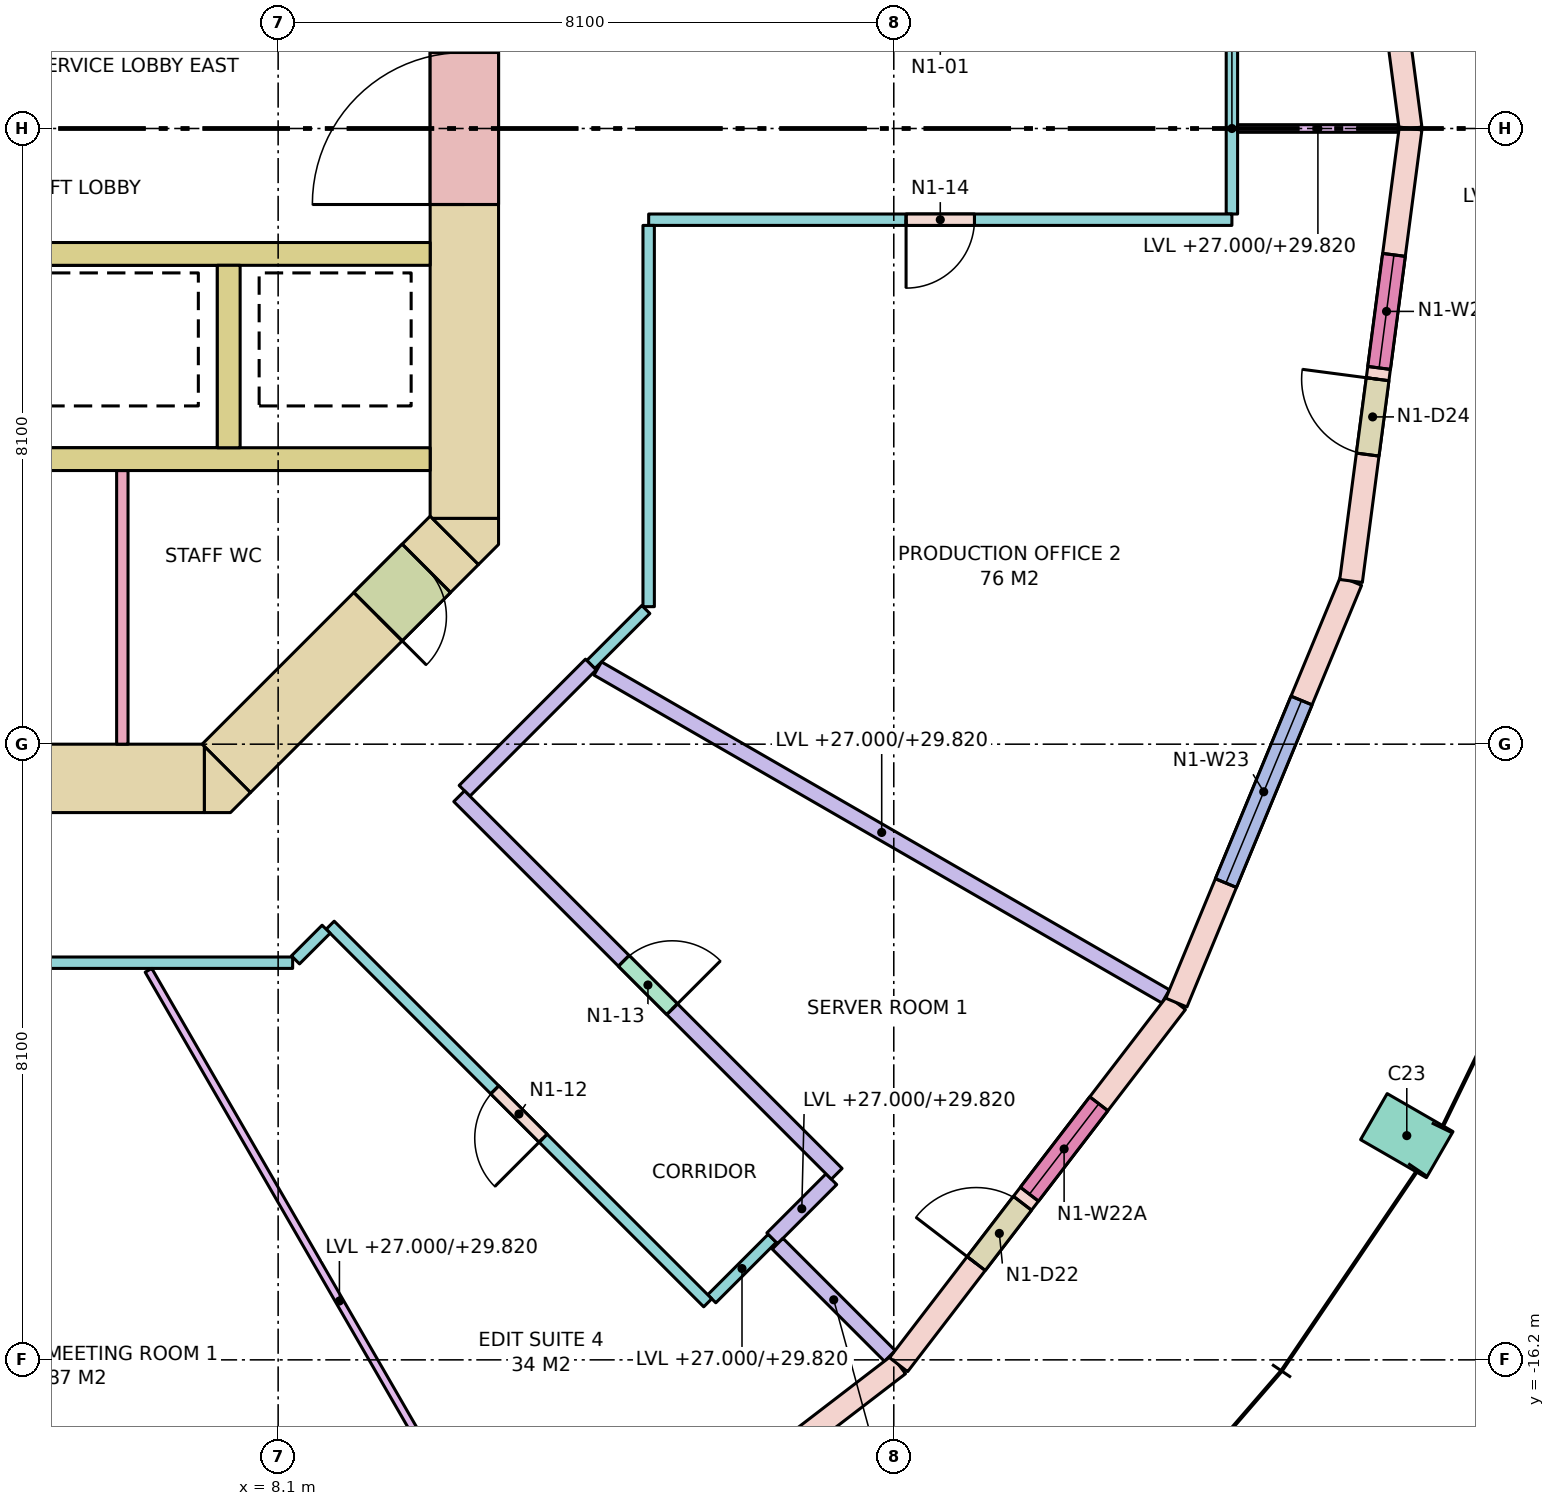
"""IFC4 building model, lengths in metres.
Left out: names, types, materials, properties, quantities, classifications, styles, units other than length and angle.
Written with IfcOpenShell. Run it as: python <this file> out.ifc"""

import sys

from ifc_helpers import new_model, si_unit, direction, frame, frame_2d, origin, origin_2d, place, context, subcontext, project, spatial, polyline, rectangle, outline, extrude, element, fill, save


model = new_model("IFC4")
c1 = context("Model", 3, precision=1e-05, world=origin(), true_north=direction((0.0, 1.0)))
c2 = subcontext(c1, "Body", "Model", "MODEL_VIEW")
j1 = project(units=[si_unit("LENGTHUNIT", "METRE"), si_unit("PLANEANGLEUNIT", "RADIAN")], contexts=[c1])
p1 = place(None, origin())
s1 = spatial("IfcSite", under=j1, at=p1, CompositionType="ELEMENT")
p2 = place(p1, origin())
s2 = spatial("IfcBuilding", under=s1, at=p2, CompositionType="ELEMENT")
p3 = place(p2, frame((0.0, 0.0, 27.0)))
s3 = spatial("IfcBuildingStorey", under=s2, at=p3, CompositionType="ELEMENT", Elevation=27.0)
p4 = place(p3, frame((22.95, -13.25, 0.0), z_axis=(0.0, 0.0, 1.0), x_axis=(0.5, 0.866025403784, 0.0)))
e1 = element("IfcColumn", 1, at=p4, inside=s3, PredefinedType="COLUMN", context=c2, shape_type="SweptSolid", body=[
    extrude(rectangle(XDim=0.7, YDim=1.0, at=origin_2d()), origin(), (0.0, 0.0, 1.0), 4.0),
])
p5 = place(p3, frame((-7.13, -8.55, -0.28), z_axis=(0.0, 0.0, 1.0), x_axis=(1.0, 0.0, 0.0)))
e2 = element("IfcWall", 2, at=p5, inside=s3, PredefinedType="SHEAR", context=c2, shape_type="SweptSolid", body=[
    extrude(rectangle(XDim=14.26, YDim=0.9, at=frame_2d((7.13, 0.0))), origin(), (0.0, 0.0, 1.0), 4.0),
])
p6 = place(p5, frame((8.08, 0.0, 0.28)))
e3 = element("IfcOpeningElement", 3, at=p6, cuts=e2, PredefinedType="OPENING", context=c2, shape_type="SweptSolid", body=[
    extrude(rectangle(XDim=0.7, YDim=2.1, at=frame_2d((0.35, 1.05))), frame((0.0, 0.46, 0.0), z_axis=(0.0, -1.0, 0.0), x_axis=(1.0, 0.0, 0.0)), (0.0, 0.0, 1.0), 0.92),
])
p7 = place(p5, frame((6.205, 0.0, 0.28)))
e4 = element("IfcOpeningElement", 4, at=p7, cuts=e2, PredefinedType="OPENING", context=c2, shape_type="SweptSolid", body=[
    extrude(rectangle(XDim=0.9, YDim=2.1, at=frame_2d((0.45, 1.05))), frame((0.0, 0.46, 0.0), z_axis=(0.0, -1.0, 0.0), x_axis=(1.0, 0.0, 0.0)), (0.0, 0.0, 1.0), 0.92),
])
p8 = place(p5, frame((10.667, 0.0, 0.28)))
e5 = element("IfcOpeningElement", 5, at=p8, cuts=e2, PredefinedType="OPENING", context=c2, shape_type="SweptSolid", body=[
    extrude(rectangle(XDim=0.9, YDim=2.1, at=frame_2d((0.45, 1.05))), frame((0.0, 0.46, 0.0), z_axis=(0.0, -1.0, 0.0), x_axis=(1.0, 0.0, 0.0)), (0.0, 0.0, 1.0), 0.92),
])
p9 = place(p3, frame((10.55, -5.13, -0.28), z_axis=(0.0, 0.0, 1.0), x_axis=(0.0, 1.0, 0.0)))
e6 = element("IfcWall", 6, at=p9, inside=s3, PredefinedType="SHEAR", context=c2, shape_type="SweptSolid", body=[
    extrude(rectangle(XDim=10.26, YDim=0.9, at=frame_2d((5.13, 0.0))), origin(), (0.0, 0.0, 1.0), 4.0),
])
p10 = place(p9, frame((4.13, 0.0, 0.28)))
e7 = element("IfcOpeningElement", 7, at=p10, cuts=e6, PredefinedType="OPENING", context=c2, shape_type="SweptSolid", body=[
    extrude(rectangle(XDim=2.0, YDim=2.1, at=frame_2d((1.0, 1.05))), frame((0.0, 0.46, 0.0), z_axis=(0.0, -1.0, 0.0), x_axis=(1.0, 0.0, 0.0)), (0.0, 0.0, 1.0), 0.92),
])
p11 = place(p3, frame((10.418, -5.418, -0.28), z_axis=(0.0, 0.0, 1.0), x_axis=(-0.707106781187, -0.707106781187, 0.0)))
e8 = element("IfcWall", 8, at=p11, inside=s3, PredefinedType="SHEAR", context=c2, shape_type="SweptSolid", body=[
    extrude(rectangle(XDim=4.243, YDim=0.9, at=frame_2d((2.121, 0.0))), origin(), (0.0, 0.0, 1.0), 4.0),
])
p12 = place(p11, frame((0.52, 0.0, 0.28)))
e9 = element("IfcOpeningElement", 9, at=p12, cuts=e8, PredefinedType="OPENING", context=c2, shape_type="SweptSolid", body=[
    extrude(rectangle(XDim=0.9, YDim=2.1, at=frame_2d((0.45, 1.05))), frame((0.0, 0.46, 0.0), z_axis=(0.0, -1.0, 0.0), x_axis=(1.0, 0.0, 0.0)), (0.0, 0.0, 1.0), 0.92),
])
p13 = place(p3, frame((0.0, 0.0, -0.28)))
e10 = element("IfcWall", 10, at=p13, inside=s3, PredefinedType="SHEAR", context=c2, shape_type="SweptSolid", body=[
    extrude(outline(polyline([(7.473, -9.0), (7.13, -9.0), (7.13, -8.13), (7.736, -8.736), (7.473, -9.0)])), origin(), (0.0, 0.0, 1.0), 4.0),
])
p14 = place(p3, frame((0.0, 0.0, -0.28)))
e11 = element("IfcWall", 11, at=p14, inside=s3, PredefinedType="SHEAR", context=c2, shape_type="SweptSolid", body=[
    extrude(outline(polyline([(11.0, -5.473), (10.736, -5.736), (10.13, -5.13), (11.0, -5.13), (11.0, -5.473)])), origin(), (0.0, 0.0, 1.0), 4.0),
])
for number, where, z_axis, x_axis in (
    (12, (2.0, -4.35, 0.0), (0.0, 0.0, 1.0), (1.0, 0.0, 0.0)),
    (13, (2.0, -1.65, 0.0), (0.0, 0.0, 1.0), (1.0, 0.0, 0.0)),
):
    element("IfcWall", number, at=place(p3, frame(where, z_axis=z_axis, x_axis=x_axis)), inside=s3, PredefinedType="SOLIDWALL", context=c2, shape_type="SweptSolid", body=[
        extrude(rectangle(XDim=8.1, YDim=0.3, at=frame_2d((4.05, 0.0))), origin(), (0.0, 0.0, 1.0), 3.72),
    ])
p15 = place(p3, frame((7.45, -4.2, 0.0), z_axis=(0.0, 0.0, 1.0), x_axis=(0.0, 1.0, 0.0)))
e14 = element("IfcWall", 14, at=p15, inside=s3, PredefinedType="SOLIDWALL", context=c2, shape_type="SweptSolid", body=[
    extrude(rectangle(XDim=2.4, YDim=0.3, at=frame_2d((1.2, 0.0))), origin(), (0.0, 0.0, 1.0), 3.72),
])
p16 = place(p3, frame((23.0, 0.0, 0.0), z_axis=(0.0, 0.0, 1.0), x_axis=(-0.130522880875, 0.991445297315, 0.0)))
e15 = element("IfcWall", 15, at=p16, inside=s3, PredefinedType="STANDARD", context=c2, shape_type="SweptSolid", body=[
    extrude(rectangle(XDim=6.004, YDim=0.3, at=frame_2d((3.002, 0.0))), origin(), (0.0, 0.0, 1.0), 3.72),
])
p17 = place(p16, frame((1.702, 0.0, 0.8)))
e16 = element("IfcOpeningElement", 16, at=p17, cuts=e15, PredefinedType="OPENING", context=c2, shape_type="SweptSolid", body=[
    extrude(rectangle(XDim=2.6, YDim=2.7, at=frame_2d((1.3, 1.35))), frame((0.0, 0.16, 0.0), z_axis=(0.0, -1.0, 0.0), x_axis=(1.0, 0.0, 0.0)), (0.0, 0.0, 1.0), 0.32),
])
p18 = place(p3, frame((11.5, -19.919, 0.0), z_axis=(0.0, 0.0, 1.0), x_axis=(0.793339924758, 0.608778912074, 0.0)))
e17 = element("IfcWall", 17, at=p18, inside=s3, PredefinedType="STANDARD", context=c2, shape_type="SweptSolid", body=[
    extrude(rectangle(XDim=6.004, YDim=0.3, at=frame_2d((3.002, 0.0))), origin(), (0.0, 0.0, 1.0), 3.72),
])
p19 = place(p18, frame((1.702, 0.0, 0.8)))
e18 = element("IfcOpeningElement", 18, at=p19, cuts=e17, PredefinedType="OPENING", context=c2, shape_type="SweptSolid", body=[
    extrude(rectangle(XDim=2.6, YDim=2.7, at=frame_2d((1.3, 1.35))), frame((0.0, 0.16, 0.0), z_axis=(0.0, -1.0, 0.0), x_axis=(1.0, 0.0, 0.0)), (0.0, 0.0, 1.0), 0.32),
])
p20 = place(p3, frame((16.263, -16.263, 0.0), z_axis=(0.0, 0.0, 1.0), x_axis=(0.608778912074, 0.793339924758, 0.0)))
e19 = element("IfcWall", 19, at=p20, inside=s3, PredefinedType="STANDARD", context=c2, shape_type="SweptSolid", body=[
    extrude(rectangle(XDim=6.004, YDim=0.3, at=frame_2d((3.002, 0.0))), origin(), (0.0, 0.0, 1.0), 3.72),
])
p21 = place(p20, frame((1.677, 0.0, 0.0)))
e20 = element("IfcOpeningElement", 20, at=p21, cuts=e19, PredefinedType="OPENING", context=c2, shape_type="SweptSolid", body=[
    extrude(rectangle(XDim=1.0, YDim=2.4, at=frame_2d((0.5, 1.2))), frame((0.0, 0.16, 0.0), z_axis=(0.0, -1.0, 0.0), x_axis=(1.0, 0.0, 0.0)), (0.0, 0.0, 1.0), 0.32),
])
p22 = place(p20, frame((2.827, 0.0, 0.8)))
e21 = element("IfcOpeningElement", 21, at=p22, cuts=e19, PredefinedType="OPENING", context=c2, shape_type="SweptSolid", body=[
    extrude(rectangle(XDim=1.5, YDim=2.7, at=frame_2d((0.75, 1.35))), frame((0.0, 0.16, 0.0), z_axis=(0.0, -1.0, 0.0), x_axis=(1.0, 0.0, 0.0)), (0.0, 0.0, 1.0), 0.32),
])
p23 = place(p3, frame((19.919, -11.5, 0.0), z_axis=(0.0, 0.0, 1.0), x_axis=(0.382671411433, 0.923884511653, 0.0)))
e22 = element("IfcWall", 22, at=p23, inside=s3, PredefinedType="STANDARD", context=c2, shape_type="SweptSolid", body=[
    extrude(rectangle(XDim=6.004, YDim=0.3, at=frame_2d((3.002, 0.0))), origin(), (0.0, 0.0, 1.0), 3.72),
])
p24 = place(p23, frame((1.702, 0.0, 0.8)))
e23 = element("IfcOpeningElement", 23, at=p24, cuts=e22, PredefinedType="OPENING", context=c2, shape_type="SweptSolid", body=[
    extrude(rectangle(XDim=2.6, YDim=2.7, at=frame_2d((1.3, 1.35))), frame((0.0, 0.16, 0.0), z_axis=(0.0, -1.0, 0.0), x_axis=(1.0, 0.0, 0.0)), (0.0, 0.0, 1.0), 0.32),
])
p25 = place(p3, frame((22.216, -5.953, 0.0), z_axis=(0.0, 0.0, 1.0), x_axis=(0.130522880875, 0.991445297315, 0.0)))
e24 = element("IfcWall", 24, at=p25, inside=s3, PredefinedType="STANDARD", context=c2, shape_type="SweptSolid", body=[
    extrude(rectangle(XDim=6.004, YDim=0.3, at=frame_2d((3.002, 0.0))), origin(), (0.0, 0.0, 1.0), 3.72),
])
p26 = place(p25, frame((1.677, 0.0, 0.0)))
e25 = element("IfcOpeningElement", 25, at=p26, cuts=e24, PredefinedType="OPENING", context=c2, shape_type="SweptSolid", body=[
    extrude(rectangle(XDim=1.0, YDim=2.4, at=frame_2d((0.5, 1.2))), frame((0.0, 0.16, 0.0), z_axis=(0.0, -1.0, 0.0), x_axis=(1.0, 0.0, 0.0)), (0.0, 0.0, 1.0), 0.32),
])
p27 = place(p25, frame((2.827, 0.0, 0.8)))
e26 = element("IfcOpeningElement", 26, at=p27, cuts=e24, PredefinedType="OPENING", context=c2, shape_type="SweptSolid", body=[
    extrude(rectangle(XDim=1.5, YDim=2.7, at=frame_2d((0.75, 1.35))), frame((0.0, 0.16, 0.0), z_axis=(0.0, -1.0, 0.0), x_axis=(1.0, 0.0, 0.0)), (0.0, 0.0, 1.0), 0.32),
])
p28 = place(p3, frame((6.05, -8.1, 0.0), z_axis=(0.0, 0.0, 1.0), x_axis=(0.0, 1.0, 0.0)))
e27 = element("IfcWall", 27, at=p28, inside=s3, PredefinedType="PARTITIONING", context=c2, shape_type="SweptSolid", body=[
    extrude(rectangle(XDim=3.6, YDim=0.15, at=frame_2d((1.8, 0.0))), origin(), (0.0, 0.0, 1.0), 3.72),
])
p29 = place(p3, frame((15.379, -13.823, 0.0), z_axis=(0.0, 0.0, 1.0), x_axis=(-0.707106781187, -0.707106781187, 0.0)))
e28 = element("IfcWall", 28, at=p29, inside=s3, PredefinedType="PARTITIONING", context=c2, shape_type="SweptSolid", body=[
    extrude(rectangle(XDim=1.1, YDim=0.2, at=frame_2d((0.55, 0.0))), origin(), (0.0, 0.0, 1.0), 2.82),
])
p30 = place(p3, frame((14.601, -14.601, 0.0), z_axis=(0.0, 0.0, 1.0), x_axis=(-0.707106781187, -0.707106781187, 0.0)))
e29 = element("IfcWall", 29, at=p30, inside=s3, PredefinedType="PARTITIONING", context=c2, shape_type="SweptSolid", body=[
    extrude(rectangle(XDim=1.125, YDim=0.15, at=frame_2d((0.562, 0.0))), origin(), (0.0, 0.0, 1.0), 2.82),
])
p31 = place(p3, frame((13.752, -15.449, 0.0), z_axis=(0.0, 0.0, 1.0), x_axis=(-0.707089406061, 0.707124155885, 0.0)))
e30 = element("IfcWall", 30, at=p31, inside=s3, PredefinedType="PARTITIONING", context=c2, shape_type="SweptSolid", body=[
    extrude(rectangle(XDim=7.026, YDim=0.15, at=frame_2d((3.513, 0.0))), origin(), (0.0, 0.0, 1.0), 3.72),
])
p32 = place(p31, frame((3.063, 0.0, 0.0)))
e31 = element("IfcOpeningElement", 31, at=p32, cuts=e30, PredefinedType="OPENING", context=c2, shape_type="SweptSolid", body=[
    extrude(rectangle(XDim=0.9, YDim=2.1, at=frame_2d((0.45, 1.05))), frame((0.0, 0.085, 0.0), z_axis=(0.0, -1.0, 0.0), x_axis=(1.0, 0.0, 0.0)), (0.0, 0.0, 1.0), 0.17),
])
p33 = place(p3, frame((8.731, -10.534, 0.0), z_axis=(0.0, 0.0, 1.0), x_axis=(-0.707106781187, -0.707106781187, 0.0)))
e32 = element("IfcWall", 32, at=p33, inside=s3, PredefinedType="PARTITIONING", context=c2, shape_type="SweptSolid", body=[
    extrude(rectangle(XDim=0.571, YDim=0.15, at=frame_2d((0.285, 0.0))), origin(), (0.0, 0.0, 1.0), 3.72),
])
p34 = place(p3, frame((8.291, -10.975, 0.0), z_axis=(0.0, 0.0, 1.0), x_axis=(-1.0, 0.0, 0.0)))
e33 = element("IfcWall", 33, at=p34, inside=s3, PredefinedType="PARTITIONING", context=c2, shape_type="SweptSolid", body=[
    extrude(rectangle(XDim=7.016, YDim=0.15, at=frame_2d((3.508, 0.0))), origin(), (0.0, 0.0, 1.0), 2.82),
])
p35 = place(p3, frame((20.649, 1.125, 0.0), z_axis=(0.0, 0.0, 1.0), x_axis=(0.0, -1.0, 0.0)))
e34 = element("IfcWall", 34, at=p35, inside=s3, PredefinedType="PARTITIONING", context=c2, shape_type="SweptSolid", body=[
    extrude(rectangle(XDim=2.25, YDim=0.15, at=frame_2d((1.125, 0.0))), origin(), (0.0, 0.0, 1.0), 2.82),
])
p36 = place(p3, frame((20.649, -1.2, 0.0), z_axis=(0.0, 0.0, 1.0), x_axis=(-1.0, 0.0, 0.0)))
e35 = element("IfcWall", 35, at=p36, inside=s3, PredefinedType="PARTITIONING", context=c2, shape_type="SweptSolid", body=[
    extrude(rectangle(XDim=7.674, YDim=0.15, at=frame_2d((3.837, 0.0))), origin(), (0.0, 0.0, 1.0), 3.72),
])
p37 = place(p36, frame((3.387, 0.0, 0.0)))
e36 = element("IfcOpeningElement", 36, at=p37, cuts=e35, PredefinedType="OPENING", context=c2, shape_type="SweptSolid", body=[
    extrude(rectangle(XDim=0.9, YDim=2.1, at=frame_2d((0.45, 1.05))), frame((0.0, 0.085, 0.0), z_axis=(0.0, -1.0, 0.0), x_axis=(1.0, 0.0, 0.0)), (0.0, 0.0, 1.0), 0.17),
])
p38 = place(p3, frame((12.975, -1.275, 0.0), z_axis=(0.0, 0.0, 1.0), x_axis=(0.0, -1.0, 0.0)))
e37 = element("IfcWall", 37, at=p38, inside=s3, PredefinedType="PARTITIONING", context=c2, shape_type="SweptSolid", body=[
    extrude(rectangle(XDim=5.016, YDim=0.15, at=frame_2d((2.508, 0.0))), origin(), (0.0, 0.0, 1.0), 2.82),
])
p39 = place(p3, frame((12.938, -6.328, 0.0), z_axis=(0.0, 0.0, 1.0), x_axis=(-0.707106781187, -0.707106781187, 0.0)))
e38 = element("IfcWall", 38, at=p39, inside=s3, PredefinedType="PARTITIONING", context=c2, shape_type="SweptSolid", body=[
    extrude(rectangle(XDim=1.024, YDim=0.15, at=frame_2d((0.512, 0.0))), origin(), (0.0, 0.0, 1.0), 2.82),
])
p40 = place(p3, frame((12.214, -7.052, 0.0), z_axis=(0.0, 0.0, 1.0), x_axis=(-0.707106781187, -0.707106781187, 0.0)))
e39 = element("IfcWall", 39, at=p40, inside=s3, PredefinedType="PARTITIONING", context=c2, shape_type="SweptSolid", body=[
    extrude(rectangle(XDim=2.35, YDim=0.2, at=frame_2d((1.175, 0.0))), origin(), (0.0, 0.0, 1.0), 2.82),
])
p41 = place(p3, frame((10.481, -8.784, 0.0), z_axis=(0.0, 0.0, 1.0), x_axis=(0.707124155885, -0.707089406061, 0.0)))
e40 = element("IfcWall", 40, at=p41, inside=s3, PredefinedType="PARTITIONING", context=c2, shape_type="SweptSolid", body=[
    extrude(rectangle(XDim=7.026, YDim=0.2, at=frame_2d((3.513, 0.0))), origin(), (0.0, 0.0, 1.0), 3.72),
])
p42 = place(p41, frame((3.063, 0.0, 0.0)))
e41 = element("IfcOpeningElement", 41, at=p42, cuts=e40, PredefinedType="OPENING", context=c2, shape_type="SweptSolid", body=[
    extrude(rectangle(XDim=0.9, YDim=2.1, at=frame_2d((0.45, 1.05))), frame((0.0, 0.11, 0.0), z_axis=(0.0, -1.0, 0.0), x_axis=(1.0, 0.0, 0.0)), (0.0, 0.0, 1.0), 0.22),
])
p43 = place(p3, frame((20.724, 0.0, 0.0), z_axis=(0.0, 0.0, 1.0), x_axis=(1.0, 0.0, 0.0)))
e42 = element("IfcWall", 42, at=p43, inside=s3, PredefinedType="PARTITIONING", context=c2, shape_type="SweptSolid", body=[
    extrude(rectangle(XDim=2.113, YDim=0.1, at=frame_2d((1.057, 0.0))), origin(), (0.0, 0.0, 1.0), 2.82),
])
p44 = place(p3, frame((6.394, -11.075, 0.0), z_axis=(0.0, 0.0, 1.0), x_axis=(0.500024592647, -0.866011204747, 0.0)))
e43 = element("IfcWall", 43, at=p44, inside=s3, PredefinedType="PARTITIONING", context=c2, shape_type="SweptSolid", body=[
    extrude(rectangle(XDim=10.049, YDim=0.1, at=frame_2d((5.024, 0.0))), origin(), (0.0, 0.0, 1.0), 2.82),
])
p45 = place(p3, frame((14.672, -14.672, 0.0), z_axis=(0.0, 0.0, 1.0), x_axis=(0.707106781187, -0.707106781187, 0.0)))
e44 = element("IfcWall", 44, at=p45, inside=s3, PredefinedType="PARTITIONING", context=c2, shape_type="SweptSolid", body=[
    extrude(rectangle(XDim=2.088, YDim=0.2, at=frame_2d((1.044, 0.0))), origin(), (0.0, 0.0, 1.0), 2.82),
])
p46 = place(p3, frame((12.305, -7.104, 0.0), z_axis=(0.0, 0.0, 1.0), x_axis=(0.866017835858, -0.500013107804, 0.0)))
e45 = element("IfcWall", 45, at=p46, inside=s3, PredefinedType="PARTITIONING", context=c2, shape_type="SweptSolid", body=[
    extrude(rectangle(XDim=8.628, YDim=0.2, at=frame_2d((4.314, 0.0))), origin(), (0.0, 0.0, 1.0), 2.82),
])
p47 = place(p21, origin())
e46 = element("IfcDoor", 46, at=p47, inside=s3, OperationType="SINGLE_SWING_LEFT", PredefinedType="DOOR", context=c2, shape_type="SweptSolid", body=[
    extrude(rectangle(XDim=1.0, YDim=2.4, at=frame_2d((0.5, 1.2))), frame((0.0, 0.025, 0.0), z_axis=(0.0, -1.0, 0.0), x_axis=(1.0, 0.0, 0.0)), (0.0, 0.0, 1.0), 0.05),
])
fill(e20, e46)
p48 = place(p22, origin())
e47 = element("IfcWindow", 47, at=p48, inside=s3, PartitioningType="SINGLE_PANEL", PredefinedType="WINDOW", context=c2, shape_type="SweptSolid", body=[
    extrude(rectangle(XDim=1.5, YDim=2.7, at=frame_2d((0.75, 1.35))), frame((0.0, 0.03, 0.0), z_axis=(0.0, -1.0, 0.0), x_axis=(1.0, 0.0, 0.0)), (0.0, 0.0, 1.0), 0.06),
])
fill(e21, e47)
p49 = place(p24, origin())
e48 = element("IfcWindow", 48, at=p49, inside=s3, PartitioningType="SINGLE_PANEL", PredefinedType="WINDOW", context=c2, shape_type="SweptSolid", body=[
    extrude(rectangle(XDim=2.6, YDim=2.7, at=frame_2d((1.3, 1.35))), frame((0.0, 0.03, 0.0), z_axis=(0.0, -1.0, 0.0), x_axis=(1.0, 0.0, 0.0)), (0.0, 0.0, 1.0), 0.06),
])
fill(e23, e48)
p50 = place(p26, origin())
e49 = element("IfcDoor", 49, at=p50, inside=s3, OperationType="SINGLE_SWING_RIGHT", PredefinedType="DOOR", context=c2, shape_type="SweptSolid", body=[
    extrude(rectangle(XDim=1.0, YDim=2.4, at=frame_2d((0.5, 1.2))), frame((0.0, 0.025, 0.0), z_axis=(0.0, -1.0, 0.0), x_axis=(1.0, 0.0, 0.0)), (0.0, 0.0, 1.0), 0.05),
])
fill(e25, e49)
p51 = place(p27, origin())
e50 = element("IfcWindow", 50, at=p51, inside=s3, PartitioningType="SINGLE_PANEL", PredefinedType="WINDOW", context=c2, shape_type="SweptSolid", body=[
    extrude(rectangle(XDim=1.5, YDim=2.7, at=frame_2d((0.75, 1.35))), frame((0.0, 0.03, 0.0), z_axis=(0.0, -1.0, 0.0), x_axis=(1.0, 0.0, 0.0)), (0.0, 0.0, 1.0), 0.06),
])
fill(e26, e50)
p52 = place(p10, origin())
e51 = element("IfcDoor", 51, at=p52, inside=s3, OperationType="DOUBLE_DOOR_SINGLE_SWING", PredefinedType="DOOR", context=c2, shape_type="SweptSolid", body=[
    extrude(rectangle(XDim=2.0, YDim=2.1, at=frame_2d((1.0, 1.05))), frame((0.0, 0.025, 0.0), z_axis=(0.0, -1.0, 0.0), x_axis=(1.0, 0.0, 0.0)), (0.0, 0.0, 1.0), 0.05),
])
fill(e7, e51)
p53 = place(p12, origin())
e52 = element("IfcDoor", 52, at=p53, inside=s3, OperationType="SINGLE_SWING_RIGHT", PredefinedType="DOOR", context=c2, shape_type="SweptSolid", body=[
    extrude(rectangle(XDim=0.9, YDim=2.1, at=frame_2d((0.45, 1.05))), frame((0.0, 0.025, 0.0), z_axis=(0.0, -1.0, 0.0), x_axis=(1.0, 0.0, 0.0)), (0.0, 0.0, 1.0), 0.05),
])
fill(e9, e52)
p54 = place(p32, origin())
e53 = element("IfcDoor", 53, at=p54, inside=s3, OperationType="SINGLE_SWING_LEFT", PredefinedType="DOOR", context=c2, shape_type="SweptSolid", body=[
    extrude(rectangle(XDim=0.9, YDim=2.1, at=frame_2d((0.45, 1.05))), frame((0.0, 0.025, 0.0), z_axis=(0.0, -1.0, 0.0), x_axis=(1.0, 0.0, 0.0)), (0.0, 0.0, 1.0), 0.05),
])
fill(e31, e53)
p55 = place(p42, origin())
e54 = element("IfcDoor", 54, at=p55, inside=s3, OperationType="SINGLE_SWING_RIGHT", PredefinedType="DOOR", context=c2, shape_type="SweptSolid", body=[
    extrude(rectangle(XDim=0.9, YDim=2.1, at=frame_2d((0.45, 1.05))), frame((0.0, 0.025, 0.0), z_axis=(0.0, -1.0, 0.0), x_axis=(1.0, 0.0, 0.0)), (0.0, 0.0, 1.0), 0.05),
])
fill(e41, e54)
p56 = place(p37, origin())
e55 = element("IfcDoor", 55, at=p56, inside=s3, OperationType="SINGLE_SWING_RIGHT", PredefinedType="DOOR", context=c2, shape_type="SweptSolid", body=[
    extrude(rectangle(XDim=0.9, YDim=2.1, at=frame_2d((0.45, 1.05))), frame((0.0, 0.025, 0.0), z_axis=(0.0, -1.0, 0.0), x_axis=(1.0, 0.0, 0.0)), (0.0, 0.0, 1.0), 0.05),
])
fill(e36, e55)
save(model, sys.argv[1])
